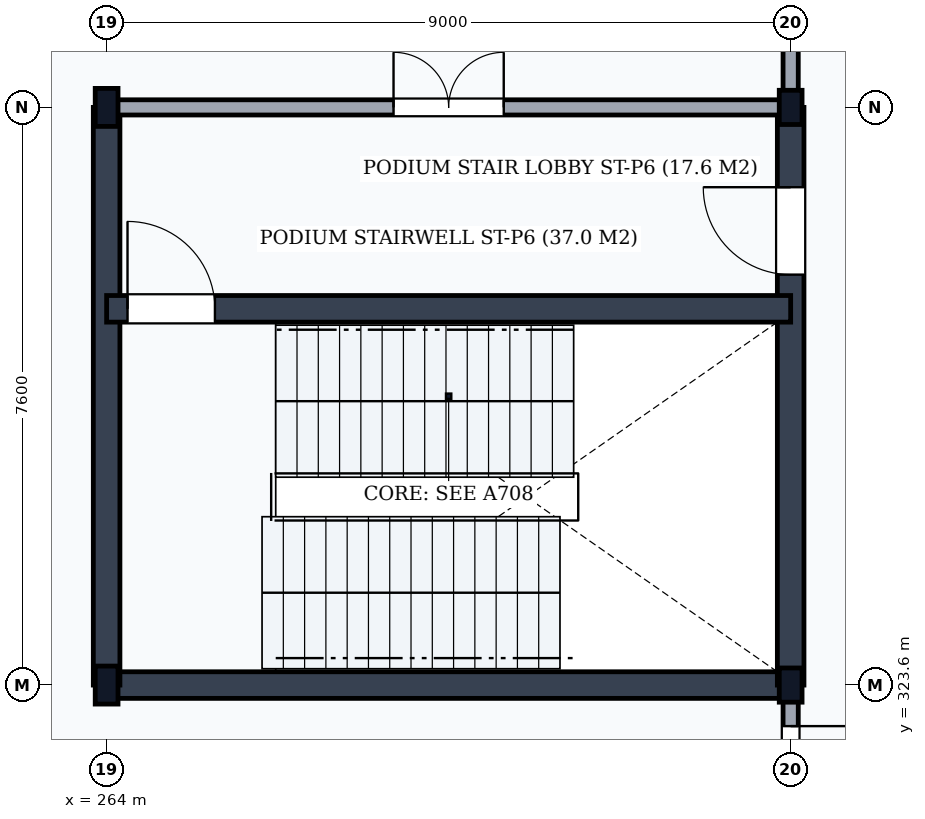
"""IFC4 building model, lengths in metres.
Left out: names, types, materials, properties, quantities, classifications, styles, units other than length and angle.
Written with IfcOpenShell. Run it as: python <this file> out.ifc"""

import sys

from ifc_helpers import new_model, si_unit, direction, frame, frame_2d, origin, origin_2d, place, context, subcontext, project, spatial, rectangle, i_section, extrude, element, fill, save


model = new_model("IFC4")
c1 = context("Model", 3, precision=1e-05, world=origin(), true_north=direction((0.0, 1.0)))
c2 = subcontext(c1, "Body", "Model", "MODEL_VIEW")
j1 = project(units=[si_unit("LENGTHUNIT", "METRE"), si_unit("PLANEANGLEUNIT", "RADIAN")], contexts=[c1])
p1 = place(None, origin())
s1 = spatial("IfcSite", under=j1, at=p1, CompositionType="ELEMENT")
p2 = place(p1, origin())
s2 = spatial("IfcBuilding", under=s1, at=p2, CompositionType="ELEMENT")
p3 = place(p2, origin())
s3 = spatial("IfcBuildingStorey", under=s2, at=p3, CompositionType="ELEMENT", Elevation=0.0)
for number, where, z_axis, x_axis in (
    (1, (264.0, 323.6, 0.0), (0.0, 0.0, 1.0), (1.0, 0.0, 0.0)),
    (2, (264.0, 331.2, 0.0), (0.0, 0.0, 1.0), (1.0, 0.0, 0.0)),
):
    element("IfcColumn", number, at=place(p3, frame(where, z_axis=z_axis, x_axis=x_axis)), inside=s3, PredefinedType="COLUMN", context=c2, shape_type="SweptSolid", body=[
        extrude(i_section(OverallWidth=0.3, OverallDepth=0.5, WebThickness=0.014, FlangeThickness=0.028, FilletRadius=0.027, at=origin_2d()), origin(), (0.0, 0.0, 1.0), 5.4),
    ])
for number, where, z_axis, x_axis in (
    (3, (273.0, 323.6, 0.0), (0.0, 0.0, 1.0), (1.0, 0.0, 0.0)),
    (4, (273.0, 331.2, 0.0), (0.0, 0.0, 1.0), (1.0, 0.0, 0.0)),
):
    element("IfcColumn", number, at=place(p3, frame(where, z_axis=z_axis, x_axis=x_axis)), inside=s3, PredefinedType="COLUMN", context=c2, shape_type="SweptSolid", body=[
        extrude(i_section(OverallWidth=0.3, OverallDepth=0.45, WebThickness=0.014, FlangeThickness=0.026, FilletRadius=0.027, at=origin_2d()), origin(), (0.0, 0.0, 1.0), 5.4),
    ])
p4 = place(p3, frame((264.0, 323.6, 0.0), z_axis=(0.0, 0.0, 1.0), x_axis=(1.0, 0.0, 0.0)))
e5 = element("IfcWall", 5, at=p4, inside=s3, PredefinedType="SHEAR", context=c2, shape_type="SweptSolid", body=[
    extrude(rectangle(XDim=9.0, YDim=0.35, at=frame_2d((4.5, 0.0))), origin(), (0.0, 0.0, 1.0), 5.14),
])
p5 = place(p3, frame((264.0, 323.6, 0.0), z_axis=(0.0, 0.0, 1.0), x_axis=(0.0, 1.0, 0.0)))
e6 = element("IfcWall", 6, at=p5, inside=s3, PredefinedType="SHEAR", context=c2, shape_type="SweptSolid", body=[
    extrude(rectangle(XDim=7.6, YDim=0.35, at=frame_2d((3.8, 0.0))), origin(), (0.0, 0.0, 1.0), 5.14),
])
p6 = place(p3, frame((273.0, 323.6, 0.0), z_axis=(0.0, 0.0, 1.0), x_axis=(0.0, 1.0, 0.0)))
e7 = element("IfcWall", 7, at=p6, inside=s3, PredefinedType="SHEAR", context=c2, shape_type="SweptSolid", body=[
    extrude(rectangle(XDim=7.6, YDim=0.35, at=frame_2d((3.8, 0.0))), origin(), (0.0, 0.0, 1.0), 5.14),
])
p7 = place(p6, frame((5.4, 0.0, 0.0)))
e8 = element("IfcOpeningElement", 8, at=p7, cuts=e7, PredefinedType="OPENING", context=c2, shape_type="SweptSolid", body=[
    extrude(rectangle(XDim=1.15, YDim=2.15, at=frame_2d((0.575, 1.075))), frame((0.0, 0.19, 0.0), z_axis=(0.0, -1.0, 0.0), x_axis=(1.0, 0.0, 0.0)), (0.0, 0.0, 1.0), 0.38),
])
p8 = place(p3, frame((264.0, 328.55, 0.0), z_axis=(0.0, 0.0, 1.0), x_axis=(1.0, 0.0, 0.0)))
e9 = element("IfcWall", 9, at=p8, inside=s3, PredefinedType="SHEAR", context=c2, shape_type="SweptSolid", body=[
    extrude(rectangle(XDim=9.0, YDim=0.35, at=frame_2d((4.5, 0.0))), origin(), (0.0, 0.0, 1.0), 5.14),
])
p9 = place(p8, frame((0.275, 0.0, 0.0)))
e10 = element("IfcOpeningElement", 10, at=p9, cuts=e9, PredefinedType="OPENING", context=c2, shape_type="SweptSolid", body=[
    extrude(rectangle(XDim=1.15, YDim=2.15, at=frame_2d((0.575, 1.075))), frame((0.0, 0.19, 0.0), z_axis=(0.0, -1.0, 0.0), x_axis=(1.0, 0.0, 0.0)), (0.0, 0.0, 1.0), 0.38),
])
p10 = place(p3, frame((264.0, 331.2, 0.0), z_axis=(0.0, 0.0, 1.0), x_axis=(1.0, 0.0, 0.0)))
e11 = element("IfcWall", 11, at=p10, inside=s3, PredefinedType="PARTITIONING", context=c2, shape_type="SweptSolid", body=[
    extrude(rectangle(XDim=9.0, YDim=0.2, at=frame_2d((4.5, 0.0))), origin(), (0.0, 0.0, 1.0), 4.588),
])
p11 = place(p10, frame((3.775, 0.0, 0.0)))
e12 = element("IfcOpeningElement", 12, at=p11, cuts=e11, PredefinedType="OPENING", context=c2, shape_type="SweptSolid", body=[
    extrude(rectangle(XDim=1.45, YDim=2.2, at=frame_2d((0.725, 1.1))), frame((0.0, 0.115, 0.0), z_axis=(0.0, -1.0, 0.0), x_axis=(1.0, 0.0, 0.0)), (0.0, 0.0, 1.0), 0.23),
])
p12 = place(p3, frame((273.0, 258.2, 0.0), z_axis=(0.0, 0.0, 1.0), x_axis=(0.0, 1.0, 0.0)))
e13 = element("IfcWall", 13, at=p12, inside=s3, PredefinedType="PARTITIONING", context=c2, shape_type="SweptSolid", body=[
    extrude(rectangle(XDim=65.4, YDim=0.2, at=frame_2d((32.7, 0.0))), origin(), (0.0, 0.0, 1.0), 4.778),
])
p13 = place(p12, frame((24.1, 0.0, 0.0)))
e14 = element("IfcOpeningElement", 14, at=p13, cuts=e13, PredefinedType="OPENING", context=c2, shape_type="SweptSolid", body=[
    extrude(rectangle(XDim=1.8, YDim=2.4, at=frame_2d((0.9, 1.2))), frame((0.0, 0.115, 0.0), z_axis=(0.0, -1.0, 0.0), x_axis=(1.0, 0.0, 0.0)), (0.0, 0.0, 1.0), 0.23),
])
p14 = place(p12, frame((63.06, 0.0, 0.0)))
e15 = element("IfcOpeningElement", 15, at=p14, cuts=e13, PredefinedType="OPENING", context=c2, shape_type="SweptSolid", body=[
    extrude(rectangle(XDim=1.8, YDim=2.4, at=frame_2d((0.9, 1.2))), frame((0.0, 0.115, 0.0), z_axis=(0.0, -1.0, 0.0), x_axis=(1.0, 0.0, 0.0)), (0.0, 0.0, 1.0), 0.23),
])
p15 = place(p3, frame((273.0, 331.2, 0.0), z_axis=(0.0, 0.0, 1.0), x_axis=(0.0, 1.0, 0.0)))
e16 = element("IfcWall", 16, at=p15, inside=s3, PredefinedType="PARTITIONING", context=c2, shape_type="SweptSolid", body=[
    extrude(rectangle(XDim=22.8, YDim=0.2, at=frame_2d((11.4, 0.0))), origin(), (0.0, 0.0, 1.0), 4.698),
])
p16 = place(p9, origin())
e17 = element("IfcDoor", 17, at=p16, inside=s3, OperationType="SINGLE_SWING_LEFT", PredefinedType="DOOR", context=c2, shape_type="SweptSolid", body=[
    extrude(rectangle(XDim=1.15, YDim=2.15, at=frame_2d((0.575, 1.075))), frame((0.0, 0.025, 0.0), z_axis=(0.0, -1.0, 0.0), x_axis=(1.0, 0.0, 0.0)), (0.0, 0.0, 1.0), 0.05),
])
fill(e10, e17)
p17 = place(p7, frame((1.15, 0.0, 0.0), z_axis=(0.0, 0.0, 1.0), x_axis=(-1.0, 0.0, 0.0)))
e18 = element("IfcDoor", 18, at=p17, inside=s3, OperationType="SINGLE_SWING_LEFT", PredefinedType="DOOR", context=c2, shape_type="SweptSolid", body=[
    extrude(rectangle(XDim=1.15, YDim=2.15, at=frame_2d((0.575, 1.075))), frame((0.0, 0.025, 0.0), z_axis=(0.0, -1.0, 0.0), x_axis=(1.0, 0.0, 0.0)), (0.0, 0.0, 1.0), 0.05),
])
fill(e8, e18)
p18 = place(p11, origin())
e19 = element("IfcDoor", 19, at=p18, inside=s3, OperationType="DOUBLE_DOOR_SINGLE_SWING", PredefinedType="DOOR", context=c2, shape_type="SweptSolid", body=[
    extrude(rectangle(XDim=1.45, YDim=2.2, at=frame_2d((0.725, 1.1))), frame((0.0, 0.025, 0.0), z_axis=(0.0, -1.0, 0.0), x_axis=(1.0, 0.0, 0.0)), (0.0, 0.0, 1.0), 0.05),
])
fill(e12, e19)
p19 = place(p14, frame((1.8, 0.0, 0.0), z_axis=(0.0, 0.0, 1.0), x_axis=(-1.0, 0.0, 0.0)))
e20 = element("IfcDoor", 20, at=p19, inside=s3, OperationType="DOUBLE_DOOR_SINGLE_SWING", PredefinedType="DOOR", context=c2, shape_type="SweptSolid", body=[
    extrude(rectangle(XDim=1.8, YDim=2.4, at=frame_2d((0.9, 1.2))), frame((0.0, 0.025, 0.0), z_axis=(0.0, -1.0, 0.0), x_axis=(1.0, 0.0, 0.0)), (0.0, 0.0, 1.0), 0.05),
])
fill(e15, e20)
save(model, sys.argv[1])
